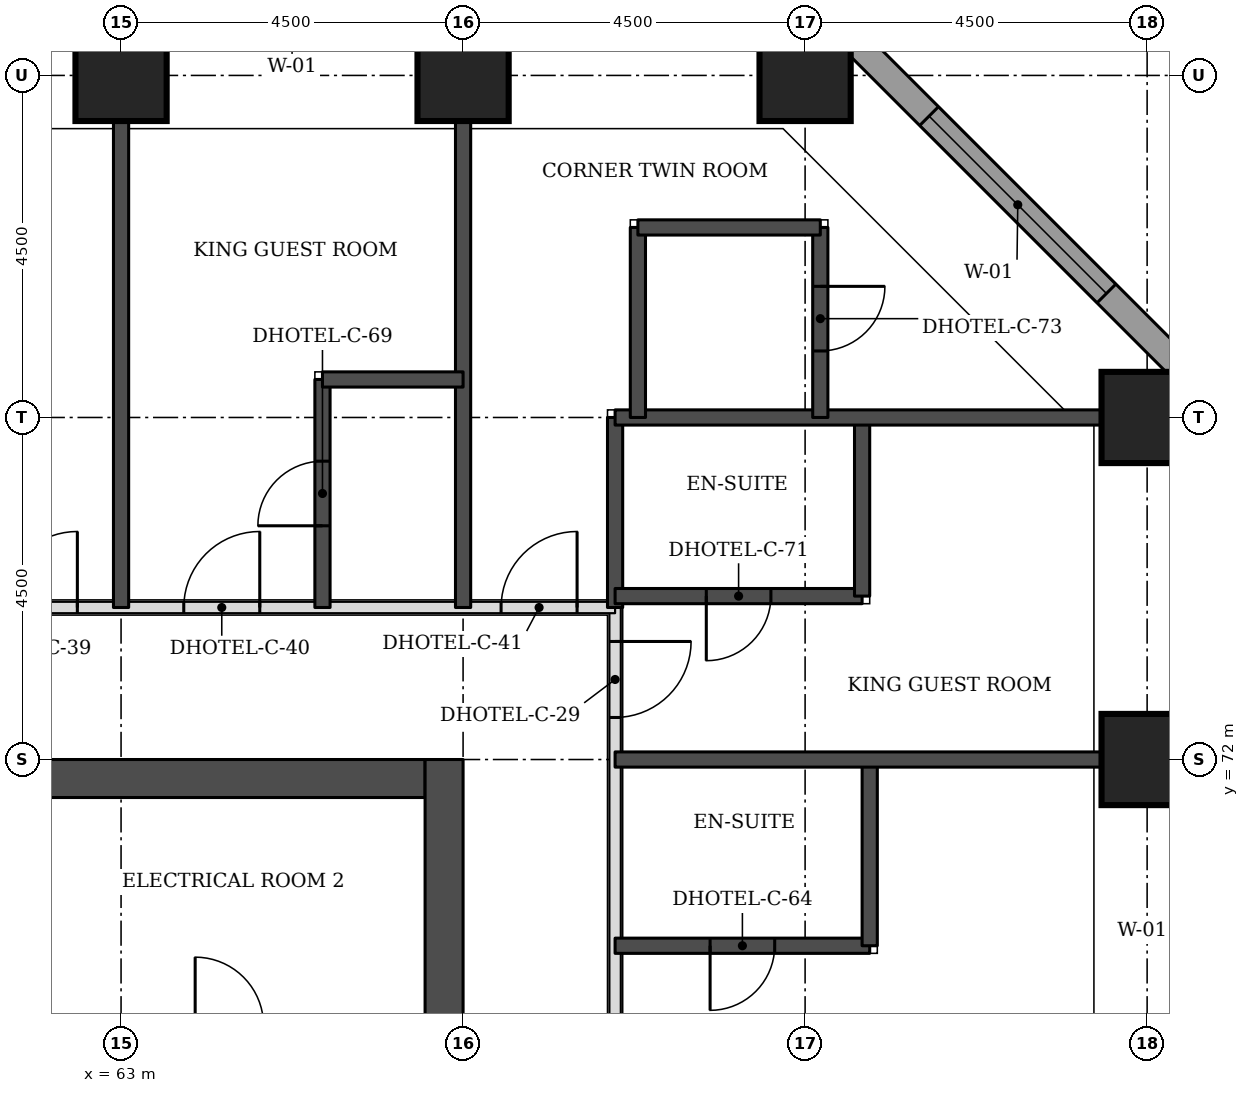
"""IFC4 building model, lengths in metres.
Left out: names, types, materials, properties, quantities, classifications, styles, units other than length and angle.
Written with IfcOpenShell. Run it as: python <this file> out.ifc"""

import sys

from ifc_helpers import new_model, si_unit, direction, frame, frame_2d, origin, origin_2d, place, context, subcontext, project, spatial, rectangle, extrude, element, fill, save


model = new_model("IFC4")
c1 = context("Model", 3, precision=1e-05, world=origin(), true_north=direction((0.0, 1.0)))
c2 = subcontext(c1, "Body", "Model", "MODEL_VIEW")
j1 = project(units=[si_unit("LENGTHUNIT", "METRE"), si_unit("PLANEANGLEUNIT", "RADIAN")], contexts=[c1])
p1 = place(None, origin())
s1 = spatial("IfcSite", under=j1, at=p1, CompositionType="ELEMENT")
p2 = place(p1, origin())
s2 = spatial("IfcBuilding", under=s1, at=p2, CompositionType="ELEMENT")
p3 = place(p2, frame((0.0, 0.0, 56.1)))
s3 = spatial("IfcBuildingStorey", under=s2, at=p3, CompositionType="ELEMENT", Elevation=56.1)
for number, where, z_axis, x_axis in (
    (1, (76.5, 72.0, 0.0), (0.0, 0.0, 1.0), (1.0, 0.0, 0.0)),
    (2, (76.5, 76.5, 0.0), (0.0, 0.0, 1.0), (1.0, 0.0, 0.0)),
    (3, (63.0, 81.0, 0.0), (0.0, 0.0, 1.0), (1.0, 0.0, 0.0)),
    (4, (67.5, 81.0, 0.0), (0.0, 0.0, 1.0), (1.0, 0.0, 0.0)),
    (5, (72.0, 81.0, 0.0), (0.0, 0.0, 1.0), (1.0, 0.0, 0.0)),
):
    element("IfcColumn", number, at=place(p3, frame(where, z_axis=z_axis, x_axis=x_axis)), inside=s3, PredefinedType="COLUMN", context=c2, shape_type="SweptSolid", body=[
        extrude(rectangle(XDim=1.2, YDim=1.2, at=origin_2d()), origin(), (0.0, 0.0, 1.0), 3.3),
    ])
p4 = place(p3, frame((45.5, 71.75, 0.0), z_axis=(0.0, 0.0, 1.0), x_axis=(1.0, 0.0, 0.0)))
e6 = element("IfcWall", 6, at=p4, inside=s3, PredefinedType="SHEAR", context=c2, shape_type="SweptSolid", body=[
    extrude(rectangle(XDim=21.5, YDim=0.5, at=frame_2d((10.75, 0.0))), origin(), (0.0, 0.0, 1.0), 3.3),
])
p5 = place(p3, frame((67.25, 49.5, 0.0), z_axis=(0.0, 0.0, 1.0), x_axis=(0.0, 1.0, 0.0)))
e7 = element("IfcWall", 7, at=p5, inside=s3, PredefinedType="SHEAR", context=c2, shape_type="SweptSolid", body=[
    extrude(rectangle(XDim=22.5, YDim=0.5, at=frame_2d((11.25, 0.0))), origin(), (0.0, 0.0, 1.0), 3.3),
])
p6 = place(p5, frame((4.2, 0.0, 0.0)))
e8 = element("IfcOpeningElement", 8, at=p6, cuts=e7, PredefinedType="OPENING", context=c2, shape_type="SweptSolid", body=[
    extrude(rectangle(XDim=1.8, YDim=2.1, at=frame_2d((0.9, 1.05))), frame((0.0, 0.26, 0.0), z_axis=(0.0, -1.0, 0.0), x_axis=(1.0, 0.0, 0.0)), (0.0, 0.0, 1.0), 0.52),
])
p7 = place(p5, frame((6.9, 0.0, 0.0)))
e9 = element("IfcOpeningElement", 9, at=p7, cuts=e7, PredefinedType="OPENING", context=c2, shape_type="SweptSolid", body=[
    extrude(rectangle(XDim=1.1, YDim=2.1, at=frame_2d((0.55, 1.05))), frame((0.0, 0.26, 0.0), z_axis=(0.0, -1.0, 0.0), x_axis=(1.0, 0.0, 0.0)), (0.0, 0.0, 1.0), 0.52),
])
p8 = place(p5, frame((13.6, 0.0, 0.0)))
e10 = element("IfcOpeningElement", 10, at=p8, cuts=e7, PredefinedType="OPENING", context=c2, shape_type="SweptSolid", body=[
    extrude(rectangle(XDim=1.1, YDim=2.1, at=frame_2d((0.55, 1.05))), frame((0.0, 0.26, 0.0), z_axis=(0.0, -1.0, 0.0), x_axis=(1.0, 0.0, 0.0)), (0.0, 0.0, 1.0), 0.52),
])
p9 = place(p5, frame((16.5, 0.0, 0.0)))
e11 = element("IfcOpeningElement", 11, at=p9, cuts=e7, PredefinedType="OPENING", context=c2, shape_type="SweptSolid", body=[
    extrude(rectangle(XDim=1.8, YDim=2.1, at=frame_2d((0.9, 1.05))), frame((0.0, 0.26, 0.0), z_axis=(0.0, -1.0, 0.0), x_axis=(1.0, 0.0, 0.0)), (0.0, 0.0, 1.0), 0.52),
])
p10 = place(p3, frame((77.326, 76.77, 0.0), z_axis=(0.0, 0.0, 1.0), x_axis=(-0.707106781187, 0.707106781187, 0.0)))
e12 = element("IfcWall", 12, at=p10, inside=s3, PredefinedType="STANDARD", context=c2, shape_type="SweptSolid", body=[
    extrude(rectangle(XDim=7.151, YDim=0.35, at=frame_2d((3.576, 0.0))), origin(), (0.0, 0.0, 1.0), 3.055),
])
p11 = place(p10, frame((1.926, 0.0, 0.8)))
e13 = element("IfcOpeningElement", 13, at=p11, cuts=e12, PredefinedType="OPENING", context=c2, shape_type="SweptSolid", body=[
    extrude(rectangle(XDim=3.3, YDim=1.5, at=frame_2d((1.65, 0.75))), frame((0.0, 0.185, 0.0), z_axis=(0.0, -1.0, 0.0), x_axis=(1.0, 0.0, 0.0)), (0.0, 0.0, 1.0), 0.37),
])
p12 = place(p3, frame((69.5, 47.5, 0.0), z_axis=(0.0, 0.0, 1.0), x_axis=(0.0, 1.0, 0.0)))
e14 = element("IfcWall", 14, at=p12, inside=s3, PredefinedType="PARTITIONING", context=c2, shape_type="SweptSolid", body=[
    extrude(rectangle(XDim=26.5, YDim=0.15, at=frame_2d((13.25, 0.0))), origin(), (0.0, 0.0, 1.0), 3.08),
])
p13 = place(p12, frame((25.053, 0.0, 0.0)))
e15 = element("IfcOpeningElement", 15, at=p13, cuts=e14, PredefinedType="OPENING", context=c2, shape_type="SweptSolid", body=[
    extrude(rectangle(XDim=1.0, YDim=2.1, at=frame_2d((0.5, 1.05))), frame((0.0, 0.085, 0.0), z_axis=(0.0, -1.0, 0.0), x_axis=(1.0, 0.0, 0.0)), (0.0, 0.0, 1.0), 0.17),
])
p14 = place(p12, frame((18.275, 0.0, 0.0)))
e16 = element("IfcOpeningElement", 16, at=p14, cuts=e14, PredefinedType="OPENING", context=c2, shape_type="SweptSolid", body=[
    extrude(rectangle(XDim=1.0, YDim=2.1, at=frame_2d((0.5, 1.05))), frame((0.0, 0.085, 0.0), z_axis=(0.0, -1.0, 0.0), x_axis=(1.0, 0.0, 0.0)), (0.0, 0.0, 1.0), 0.17),
])
p15 = place(p12, frame((12.15, 0.0, 0.0)))
e17 = element("IfcOpeningElement", 17, at=p15, cuts=e14, PredefinedType="OPENING", context=c2, shape_type="SweptSolid", body=[
    extrude(rectangle(XDim=1.1, YDim=2.1, at=frame_2d((0.55, 1.05))), frame((0.0, 0.085, 0.0), z_axis=(0.0, -1.0, 0.0), x_axis=(1.0, 0.0, 0.0)), (0.0, 0.0, 1.0), 0.17),
])
p16 = place(p12, frame((2.825, 0.0, 0.0)))
e18 = element("IfcOpeningElement", 18, at=p16, cuts=e14, PredefinedType="OPENING", context=c2, shape_type="SweptSolid", body=[
    extrude(rectangle(XDim=1.0, YDim=2.1, at=frame_2d((0.5, 1.05))), frame((0.0, 0.085, 0.0), z_axis=(0.0, -1.0, 0.0), x_axis=(1.0, 0.0, 0.0)), (0.0, 0.0, 1.0), 0.17),
])
p17 = place(p12, frame((0.447, 0.0, 0.0)))
e19 = element("IfcOpeningElement", 19, at=p17, cuts=e14, PredefinedType="OPENING", context=c2, shape_type="SweptSolid", body=[
    extrude(rectangle(XDim=1.0, YDim=2.1, at=frame_2d((0.5, 1.05))), frame((0.0, 0.085, 0.0), z_axis=(0.0, -1.0, 0.0), x_axis=(1.0, 0.0, 0.0)), (0.0, 0.0, 1.0), 0.17),
])
p18 = place(p3, frame((43.0, 74.0, 0.0), z_axis=(0.0, 0.0, 1.0), x_axis=(1.0, 0.0, 0.0)))
e20 = element("IfcWall", 20, at=p18, inside=s3, PredefinedType="PARTITIONING", context=c2, shape_type="SweptSolid", body=[
    extrude(rectangle(XDim=26.5, YDim=0.15, at=frame_2d((13.25, 0.0))), origin(), (0.0, 0.0, 1.0), 3.08),
])
p19 = place(p18, frame((2.825, 0.0, 0.0)))
e21 = element("IfcOpeningElement", 21, at=p19, cuts=e20, PredefinedType="OPENING", context=c2, shape_type="SweptSolid", body=[
    extrude(rectangle(XDim=1.0, YDim=2.1, at=frame_2d((0.5, 1.05))), frame((0.0, 0.085, 0.0), z_axis=(0.0, -1.0, 0.0), x_axis=(1.0, 0.0, 0.0)), (0.0, 0.0, 1.0), 0.17),
])
p20 = place(p18, frame((9.425, 0.0, 0.0)))
e22 = element("IfcOpeningElement", 22, at=p20, cuts=e20, PredefinedType="OPENING", context=c2, shape_type="SweptSolid", body=[
    extrude(rectangle(XDim=1.0, YDim=2.1, at=frame_2d((0.5, 1.05))), frame((0.0, 0.085, 0.0), z_axis=(0.0, -1.0, 0.0), x_axis=(1.0, 0.0, 0.0)), (0.0, 0.0, 1.0), 0.17),
])
p21 = place(p18, frame((11.825, 0.0, 0.0)))
e23 = element("IfcOpeningElement", 23, at=p21, cuts=e20, PredefinedType="OPENING", context=c2, shape_type="SweptSolid", body=[
    extrude(rectangle(XDim=1.0, YDim=2.1, at=frame_2d((0.5, 1.05))), frame((0.0, 0.085, 0.0), z_axis=(0.0, -1.0, 0.0), x_axis=(1.0, 0.0, 0.0)), (0.0, 0.0, 1.0), 0.17),
])
p22 = place(p18, frame((18.425, 0.0, 0.0)))
e24 = element("IfcOpeningElement", 24, at=p22, cuts=e20, PredefinedType="OPENING", context=c2, shape_type="SweptSolid", body=[
    extrude(rectangle(XDim=1.0, YDim=2.1, at=frame_2d((0.5, 1.05))), frame((0.0, 0.085, 0.0), z_axis=(0.0, -1.0, 0.0), x_axis=(1.0, 0.0, 0.0)), (0.0, 0.0, 1.0), 0.17),
])
p23 = place(p18, frame((20.825, 0.0, 0.0)))
e25 = element("IfcOpeningElement", 25, at=p23, cuts=e20, PredefinedType="OPENING", context=c2, shape_type="SweptSolid", body=[
    extrude(rectangle(XDim=1.0, YDim=2.1, at=frame_2d((0.5, 1.05))), frame((0.0, 0.085, 0.0), z_axis=(0.0, -1.0, 0.0), x_axis=(1.0, 0.0, 0.0)), (0.0, 0.0, 1.0), 0.17),
])
p24 = place(p18, frame((0.5, 0.0, 0.0)))
e26 = element("IfcOpeningElement", 26, at=p24, cuts=e20, PredefinedType="OPENING", context=c2, shape_type="SweptSolid", body=[
    extrude(rectangle(XDim=1.0, YDim=2.1, at=frame_2d((0.5, 1.05))), frame((0.0, 0.085, 0.0), z_axis=(0.0, -1.0, 0.0), x_axis=(1.0, 0.0, 0.0)), (0.0, 0.0, 1.0), 0.17),
])
p25 = place(p18, frame((25.0, 0.0, 0.0)))
e27 = element("IfcOpeningElement", 27, at=p25, cuts=e20, PredefinedType="OPENING", context=c2, shape_type="SweptSolid", body=[
    extrude(rectangle(XDim=1.0, YDim=2.1, at=frame_2d((0.5, 1.05))), frame((0.0, 0.085, 0.0), z_axis=(0.0, -1.0, 0.0), x_axis=(1.0, 0.0, 0.0)), (0.0, 0.0, 1.0), 0.17),
])
p26 = place(p3, frame((69.5, 69.55, 0.0), z_axis=(0.0, 0.0, 1.0), x_axis=(1.0, 0.0, 0.0)))
e28 = element("IfcWall", 28, at=p26, inside=s3, PredefinedType="SOLIDWALL", context=c2, shape_type="SweptSolid", body=[
    extrude(rectangle(XDim=3.35, YDim=0.2, at=frame_2d((1.675, 0.0))), origin(), (0.0, 0.0, 1.0), 3.08),
])
p27 = place(p26, frame((1.25, 0.0, 0.0)))
e29 = element("IfcOpeningElement", 29, at=p27, cuts=e28, PredefinedType="OPENING", context=c2, shape_type="SweptSolid", body=[
    extrude(rectangle(XDim=0.85, YDim=2.1, at=frame_2d((0.425, 1.05))), frame((0.0, 0.11, 0.0), z_axis=(0.0, -1.0, 0.0), x_axis=(1.0, 0.0, 0.0)), (0.0, 0.0, 1.0), 0.22),
])
p28 = place(p3, frame((72.85, 69.55, 0.0), z_axis=(0.0, 0.0, 1.0), x_axis=(0.0, 1.0, 0.0)))
e30 = element("IfcWall", 30, at=p28, inside=s3, PredefinedType="SOLIDWALL", context=c2, shape_type="SweptSolid", body=[
    extrude(rectangle(XDim=2.45, YDim=0.2, at=frame_2d((1.225, 0.0))), origin(), (0.0, 0.0, 1.0), 3.08),
])
for number, where, z_axis, x_axis in (
    (31, (69.5, 72.0, 0.0), (0.0, 0.0, 1.0), (1.0, 0.0, 0.0)),
    (32, (63.0, 74.0, 0.0), (0.0, 0.0, 1.0), (0.0, 1.0, 0.0)),
):
    element("IfcWall", number, at=place(p3, frame(where, z_axis=z_axis, x_axis=x_axis)), inside=s3, PredefinedType="SOLIDWALL", context=c2, shape_type="SweptSolid", body=[
        extrude(rectangle(XDim=6.4, YDim=0.2, at=frame_2d((3.2, 0.0))), origin(), (0.0, 0.0, 1.0), 3.08),
    ])
p29 = place(p3, frame((65.65, 74.0, 0.0), z_axis=(0.0, 0.0, 1.0), x_axis=(0.0, 1.0, 0.0)))
e33 = element("IfcWall", 33, at=p29, inside=s3, PredefinedType="SOLIDWALL", context=c2, shape_type="SweptSolid", body=[
    extrude(rectangle(XDim=3.0, YDim=0.2, at=frame_2d((1.5, 0.0))), origin(), (0.0, 0.0, 1.0), 3.08),
])
p30 = place(p29, frame((1.075, 0.0, 0.0)))
e34 = element("IfcOpeningElement", 34, at=p30, cuts=e33, PredefinedType="OPENING", context=c2, shape_type="SweptSolid", body=[
    extrude(rectangle(XDim=0.85, YDim=2.1, at=frame_2d((0.425, 1.05))), frame((0.0, 0.11, 0.0), z_axis=(0.0, -1.0, 0.0), x_axis=(1.0, 0.0, 0.0)), (0.0, 0.0, 1.0), 0.22),
])
p31 = place(p3, frame((67.5, 74.0, 0.0), z_axis=(0.0, 0.0, 1.0), x_axis=(0.0, 1.0, 0.0)))
e35 = element("IfcWall", 35, at=p31, inside=s3, PredefinedType="SOLIDWALL", context=c2, shape_type="SweptSolid", body=[
    extrude(rectangle(XDim=6.4, YDim=0.2, at=frame_2d((3.2, 0.0))), origin(), (0.0, 0.0, 1.0), 3.08),
])
p32 = place(p3, frame((69.5, 74.0, 0.0), z_axis=(0.0, 0.0, 1.0), x_axis=(0.0, 1.0, 0.0)))
e36 = element("IfcWall", 36, at=p32, inside=s3, PredefinedType="SOLIDWALL", context=c2, shape_type="SweptSolid", body=[
    extrude(rectangle(XDim=2.5, YDim=0.2, at=frame_2d((1.25, 0.0))), origin(), (0.0, 0.0, 1.0), 3.08),
])
p33 = place(p3, frame((69.5, 74.15, 0.0), z_axis=(0.0, 0.0, 1.0), x_axis=(1.0, 0.0, 0.0)))
e37 = element("IfcWall", 37, at=p33, inside=s3, PredefinedType="SOLIDWALL", context=c2, shape_type="SweptSolid", body=[
    extrude(rectangle(XDim=3.25, YDim=0.2, at=frame_2d((1.625, 0.0))), origin(), (0.0, 0.0, 1.0), 3.08),
])
p34 = place(p33, frame((1.2, 0.0, 0.0)))
e38 = element("IfcOpeningElement", 38, at=p34, cuts=e37, PredefinedType="OPENING", context=c2, shape_type="SweptSolid", body=[
    extrude(rectangle(XDim=0.85, YDim=2.1, at=frame_2d((0.425, 1.05))), frame((0.0, 0.11, 0.0), z_axis=(0.0, -1.0, 0.0), x_axis=(1.0, 0.0, 0.0)), (0.0, 0.0, 1.0), 0.22),
])
p35 = place(p3, frame((72.75, 74.15, 0.0), z_axis=(0.0, 0.0, 1.0), x_axis=(0.0, 1.0, 0.0)))
e39 = element("IfcWall", 39, at=p35, inside=s3, PredefinedType="SOLIDWALL", context=c2, shape_type="SweptSolid", body=[
    extrude(rectangle(XDim=2.35, YDim=0.2, at=frame_2d((1.175, 0.0))), origin(), (0.0, 0.0, 1.0), 3.08),
])
p36 = place(p3, frame((69.5, 76.5, 0.0), z_axis=(0.0, 0.0, 1.0), x_axis=(1.0, 0.0, 0.0)))
e40 = element("IfcWall", 40, at=p36, inside=s3, PredefinedType="SOLIDWALL", context=c2, shape_type="SweptSolid", body=[
    extrude(rectangle(XDim=6.4, YDim=0.2, at=frame_2d((3.2, 0.0))), origin(), (0.0, 0.0, 1.0), 3.08),
])
p37 = place(p3, frame((69.8, 76.5, 0.0), z_axis=(0.0, 0.0, 1.0), x_axis=(0.0, 1.0, 0.0)))
e41 = element("IfcWall", 41, at=p37, inside=s3, PredefinedType="SOLIDWALL", context=c2, shape_type="SweptSolid", body=[
    extrude(rectangle(XDim=2.5, YDim=0.2, at=frame_2d((1.25, 0.0))), origin(), (0.0, 0.0, 1.0), 3.08),
])
p38 = place(p3, frame((72.2, 76.5, 0.0), z_axis=(0.0, 0.0, 1.0), x_axis=(0.0, 1.0, 0.0)))
e42 = element("IfcWall", 42, at=p38, inside=s3, PredefinedType="SOLIDWALL", context=c2, shape_type="SweptSolid", body=[
    extrude(rectangle(XDim=2.5, YDim=0.2, at=frame_2d((1.25, 0.0))), origin(), (0.0, 0.0, 1.0), 3.08),
])
p39 = place(p38, frame((0.875, 0.0, 0.0)))
e43 = element("IfcOpeningElement", 43, at=p39, cuts=e42, PredefinedType="OPENING", context=c2, shape_type="SweptSolid", body=[
    extrude(rectangle(XDim=0.85, YDim=2.1, at=frame_2d((0.425, 1.05))), frame((0.0, 0.11, 0.0), z_axis=(0.0, -1.0, 0.0), x_axis=(1.0, 0.0, 0.0)), (0.0, 0.0, 1.0), 0.22),
])
p40 = place(p3, frame((65.65, 77.0, 0.0), z_axis=(0.0, 0.0, 1.0), x_axis=(1.0, 0.0, 0.0)))
e44 = element("IfcWall", 44, at=p40, inside=s3, PredefinedType="SOLIDWALL", context=c2, shape_type="SweptSolid", body=[
    extrude(rectangle(XDim=1.85, YDim=0.2, at=frame_2d((0.925, 0.0))), origin(), (0.0, 0.0, 1.0), 3.08),
])
p41 = place(p3, frame((69.8, 79.0, 0.0), z_axis=(0.0, 0.0, 1.0), x_axis=(1.0, 0.0, 0.0)))
e45 = element("IfcWall", 45, at=p41, inside=s3, PredefinedType="SOLIDWALL", context=c2, shape_type="SweptSolid", body=[
    extrude(rectangle(XDim=2.4, YDim=0.2, at=frame_2d((1.2, 0.0))), origin(), (0.0, 0.0, 1.0), 3.08),
])
p42 = place(p11, origin())
e46 = element("IfcWindow", 46, at=p42, inside=s3, PartitioningType="SINGLE_PANEL", PredefinedType="WINDOW", context=c2, shape_type="SweptSolid", body=[
    extrude(rectangle(XDim=3.3, YDim=1.5, at=frame_2d((1.65, 0.75))), frame((0.0, 0.085, 0.0), z_axis=(0.0, -1.0, 0.0), x_axis=(1.0, 0.0, 0.0)), (0.0, 0.0, 1.0), 0.06),
])
fill(e13, e46)
p43 = place(p22, origin())
e47 = element("IfcDoor", 47, at=p43, inside=s3, OperationType="SINGLE_SWING_RIGHT", PredefinedType="DOOR", context=c2, shape_type="SweptSolid", body=[
    extrude(rectangle(XDim=1.0, YDim=2.1, at=frame_2d((0.5, 1.05))), frame((0.0, 0.025, 0.0), z_axis=(0.0, -1.0, 0.0), x_axis=(1.0, 0.0, 0.0)), (0.0, 0.0, 1.0), 0.05),
])
fill(e24, e47)
p44 = place(p23, origin())
e48 = element("IfcDoor", 48, at=p44, inside=s3, OperationType="SINGLE_SWING_RIGHT", PredefinedType="DOOR", context=c2, shape_type="SweptSolid", body=[
    extrude(rectangle(XDim=1.0, YDim=2.1, at=frame_2d((0.5, 1.05))), frame((0.0, 0.025, 0.0), z_axis=(0.0, -1.0, 0.0), x_axis=(1.0, 0.0, 0.0)), (0.0, 0.0, 1.0), 0.05),
])
fill(e25, e48)
p45 = place(p30, origin())
e49 = element("IfcDoor", 49, at=p45, inside=s3, OperationType="SINGLE_SWING_LEFT", PredefinedType="DOOR", context=c2, shape_type="SweptSolid", body=[
    extrude(rectangle(XDim=0.85, YDim=2.1, at=frame_2d((0.425, 1.05))), frame((0.0, 0.025, 0.0), z_axis=(0.0, -1.0, 0.0), x_axis=(1.0, 0.0, 0.0)), (0.0, 0.0, 1.0), 0.05),
])
fill(e34, e49)
p46 = place(p13, frame((1.0, 0.0, 0.0), z_axis=(0.0, 0.0, 1.0), x_axis=(-1.0, 0.0, 0.0)))
e50 = element("IfcDoor", 50, at=p46, inside=s3, OperationType="SINGLE_SWING_LEFT", PredefinedType="DOOR", context=c2, shape_type="SweptSolid", body=[
    extrude(rectangle(XDim=1.0, YDim=2.1, at=frame_2d((0.5, 1.05))), frame((0.0, 0.025, 0.0), z_axis=(0.0, -1.0, 0.0), x_axis=(1.0, 0.0, 0.0)), (0.0, 0.0, 1.0), 0.05),
])
fill(e15, e50)
p47 = place(p34, frame((0.85, 0.0, 0.0), z_axis=(0.0, 0.0, 1.0), x_axis=(-1.0, 0.0, 0.0)))
e51 = element("IfcDoor", 51, at=p47, inside=s3, OperationType="SINGLE_SWING_RIGHT", PredefinedType="DOOR", context=c2, shape_type="SweptSolid", body=[
    extrude(rectangle(XDim=0.85, YDim=2.1, at=frame_2d((0.425, 1.05))), frame((0.0, 0.025, 0.0), z_axis=(0.0, -1.0, 0.0), x_axis=(1.0, 0.0, 0.0)), (0.0, 0.0, 1.0), 0.05),
])
fill(e38, e51)
p48 = place(p27, frame((0.85, 0.0, 0.0), z_axis=(0.0, 0.0, 1.0), x_axis=(-1.0, 0.0, 0.0)))
e52 = element("IfcDoor", 52, at=p48, inside=s3, OperationType="SINGLE_SWING_RIGHT", PredefinedType="DOOR", context=c2, shape_type="SweptSolid", body=[
    extrude(rectangle(XDim=0.85, YDim=2.1, at=frame_2d((0.425, 1.05))), frame((0.0, 0.025, 0.0), z_axis=(0.0, -1.0, 0.0), x_axis=(1.0, 0.0, 0.0)), (0.0, 0.0, 1.0), 0.05),
])
fill(e29, e52)
p49 = place(p25, origin())
e53 = element("IfcDoor", 53, at=p49, inside=s3, OperationType="SINGLE_SWING_RIGHT", PredefinedType="DOOR", context=c2, shape_type="SweptSolid", body=[
    extrude(rectangle(XDim=1.0, YDim=2.1, at=frame_2d((0.5, 1.05))), frame((0.0, 0.025, 0.0), z_axis=(0.0, -1.0, 0.0), x_axis=(1.0, 0.0, 0.0)), (0.0, 0.0, 1.0), 0.05),
])
fill(e27, e53)
p50 = place(p39, frame((0.85, 0.0, 0.0), z_axis=(0.0, 0.0, 1.0), x_axis=(-1.0, 0.0, 0.0)))
e54 = element("IfcDoor", 54, at=p50, inside=s3, OperationType="SINGLE_SWING_LEFT", PredefinedType="DOOR", context=c2, shape_type="SweptSolid", body=[
    extrude(rectangle(XDim=0.85, YDim=2.1, at=frame_2d((0.425, 1.05))), frame((0.0, 0.025, 0.0), z_axis=(0.0, -1.0, 0.0), x_axis=(1.0, 0.0, 0.0)), (0.0, 0.0, 1.0), 0.05),
])
fill(e43, e54)
save(model, sys.argv[1])
